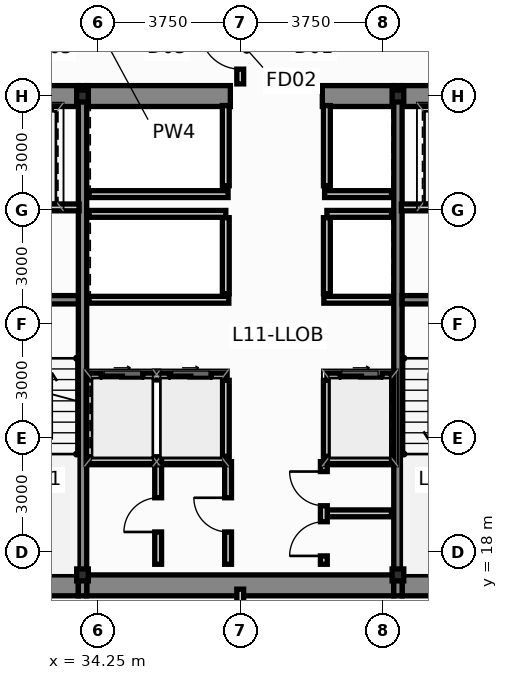
"""IFC4 building model, lengths in metres.
Left out: names, types, materials, properties, quantities, classifications, styles, units other than length and angle.
Written with IfcOpenShell. Run it as: python <this file> out.ifc"""

import sys

from ifc_helpers import new_model, si_unit, direction, frame, frame_2d, origin, origin_2d, place, context, subcontext, project, spatial, rectangle, i_section, extrude, source, transform, mapped, element, fill, save


model = new_model("IFC4")
c1 = context("Model", 3, precision=1e-05, world=origin(), true_north=direction((0.0, 1.0)))
c2 = subcontext(c1, "Body", "Model", "MODEL_VIEW")
j1 = project(units=[si_unit("LENGTHUNIT", "METRE"), si_unit("PLANEANGLEUNIT", "RADIAN")], contexts=[c1])
p1 = place(None, origin())
s1 = spatial("IfcSite", under=j1, at=p1, CompositionType="ELEMENT")
p2 = place(p1, origin())
s2 = spatial("IfcBuilding", under=s1, at=p2, CompositionType="ELEMENT")
p3 = place(p2, frame((0.0, 0.0, 45.85)))
s3 = spatial("IfcBuildingStorey", under=s2, at=p3, CompositionType="ELEMENT", Elevation=45.85)
m1 = source(origin(), c2, "Body", "SweptSolid", [
    extrude(i_section(OverallWidth=0.307, OverallDepth=0.315, WebThickness=0.012, FlangeThickness=0.019, at=origin_2d()), origin(), (0.0, 0.0, 1.0), 3.65),
])
for number, where, z_axis, x_axis in (
    (1, (33.85, 17.4, 0.0), (0.0, 0.0, 1.0), (1.0, 0.0, 0.0)),
    (2, (42.15, 17.4, 0.0), (0.0, 0.0, 1.0), (1.0, 0.0, 0.0)),
    (3, (33.85, 30.0, 0.0), (0.0, 0.0, 1.0), (1.0, 0.0, 0.0)),
    (4, (42.15, 30.0, 0.0), (0.0, 0.0, 1.0), (1.0, 0.0, 0.0)),
):
    element("IfcColumn", number, at=place(p3, frame(where, z_axis=z_axis, x_axis=x_axis)), inside=s3, PredefinedType="COLUMN", context=c2, shape_type="MappedRepresentation", body=[
        mapped(m1, transform((0.0, 0.0, 0.0), scale=1.0)),
    ])
p4 = place(p3, frame((30.84, 17.125, 0.0), z_axis=(0.0, 0.0, 1.0), x_axis=(1.0, 0.0, 0.0)))
e5 = element("IfcWall", 5, at=p4, inside=s3, PredefinedType="SHEAR", context=c2, shape_type="SweptSolid", body=[
    extrude(rectangle(XDim=2.9, YDim=0.55, at=frame_2d((1.45, 0.0))), origin(), (0.0, 0.0, 1.0), 3.65),
])
p5 = place(p3, frame((33.96, 17.125, 0.0), z_axis=(0.0, 0.0, 1.0), x_axis=(1.0, 0.0, 0.0)))
e6 = element("IfcWall", 6, at=p5, inside=s3, PredefinedType="SHEAR", context=c2, shape_type="SweptSolid", body=[
    extrude(rectangle(XDim=8.08, YDim=0.55, at=frame_2d((4.04, 0.0))), origin(), (0.0, 0.0, 1.0), 3.65),
])
for number, where, z_axis, x_axis in (
    (7, (42.26, 17.125, 0.0), (0.0, 0.0, 1.0), (1.0, 0.0, 0.0)),
    (8, (30.84, 30.0, 0.0), (0.0, 0.0, 1.0), (1.0, 0.0, 0.0)),
):
    element("IfcWall", number, at=place(p3, frame(where, z_axis=z_axis, x_axis=x_axis)), inside=s3, PredefinedType="SHEAR", context=c2, shape_type="SweptSolid", body=[
        extrude(rectangle(XDim=2.9, YDim=0.55, at=frame_2d((1.45, 0.0))), origin(), (0.0, 0.0, 1.0), 3.65),
    ])
p6 = place(p3, frame((33.96, 30.0, 0.0), z_axis=(0.0, 0.0, 1.0), x_axis=(1.0, 0.0, 0.0)))
e9 = element("IfcWall", 9, at=p6, inside=s3, PredefinedType="SHEAR", context=c2, shape_type="SweptSolid", body=[
    extrude(rectangle(XDim=3.78, YDim=0.55, at=frame_2d((1.89, 0.0))), origin(), (0.0, 0.0, 1.0), 3.65),
])
p7 = place(p3, frame((40.16, 30.0, 0.0), z_axis=(0.0, 0.0, 1.0), x_axis=(1.0, 0.0, 0.0)))
e10 = element("IfcWall", 10, at=p7, inside=s3, PredefinedType="SHEAR", context=c2, shape_type="SweptSolid", body=[
    extrude(rectangle(XDim=1.88, YDim=0.55, at=frame_2d((0.94, 0.0))), origin(), (0.0, 0.0, 1.0), 3.65),
])
p8 = place(p3, frame((42.26, 30.0, 0.0), z_axis=(0.0, 0.0, 1.0), x_axis=(1.0, 0.0, 0.0)))
e11 = element("IfcWall", 11, at=p8, inside=s3, PredefinedType="SHEAR", context=c2, shape_type="SweptSolid", body=[
    extrude(rectangle(XDim=2.9, YDim=0.55, at=frame_2d((1.45, 0.0))), origin(), (0.0, 0.0, 1.0), 3.65),
])
for number, where, z_axis, x_axis in (
    (12, (33.85, 16.85, 0.0), (0.0, 0.0, 1.0), (0.0, 1.0, 0.0)),
    (13, (42.15, 16.85, 0.0), (0.0, 0.0, 1.0), (0.0, 1.0, 0.0)),
):
    element("IfcWall", number, at=place(p3, frame(where, z_axis=z_axis, x_axis=x_axis)), inside=s3, PredefinedType="SHEAR", context=c2, shape_type="SweptSolid", body=[
        extrude(rectangle(XDim=13.425, YDim=0.22, at=frame_2d((6.712, 0.0))), origin(), (0.0, 0.0, 1.0), 3.65),
    ])
for number, where, z_axis, x_axis in (
    (14, (30.84, 24.64, 0.0), (0.0, 0.0, 1.0), (1.0, 0.0, 0.0)),
    (15, (42.26, 24.64, 0.0), (0.0, 0.0, 1.0), (1.0, 0.0, 0.0)),
):
    element("IfcWall", number, at=place(p3, frame(where, z_axis=z_axis, x_axis=x_axis)), inside=s3, PredefinedType="SHEAR", context=c2, shape_type="SweptSolid", body=[
        extrude(rectangle(XDim=2.9, YDim=0.22, at=frame_2d((1.45, 0.0))), origin(), (0.0, 0.0, 1.0), 3.65),
    ])
p9 = place(p3, frame((34.02, 22.62, 0.0), z_axis=(0.0, 0.0, 1.0), x_axis=(1.0, 0.0, 0.0)))
e16 = element("IfcWall", 16, at=p9, inside=s3, PredefinedType="PARTITIONING", context=c2, shape_type="SweptSolid", body=[
    extrude(rectangle(XDim=3.6, YDim=0.18, at=frame_2d((1.8, 0.0))), origin(), (0.0, 0.0, 1.0), 3.4),
])
p10 = place(p9, frame((0.32, 0.0, 0.0)))
e17 = element("IfcOpeningElement", 17, at=p10, cuts=e16, PredefinedType="OPENING", context=c2, shape_type="SweptSolid", body=[
    extrude(rectangle(XDim=1.1, YDim=2.2, at=frame_2d((0.55, 1.1))), frame((0.0, 0.102, 0.0), z_axis=(0.0, -1.0, 0.0), x_axis=(1.0, 0.0, 0.0)), (0.0, 0.0, 1.0), 0.204),
])
p11 = place(p9, frame((2.12, 0.0, 0.0)))
e18 = element("IfcOpeningElement", 18, at=p11, cuts=e16, PredefinedType="OPENING", context=c2, shape_type="SweptSolid", body=[
    extrude(rectangle(XDim=1.1, YDim=2.2, at=frame_2d((0.55, 1.1))), frame((0.0, 0.102, 0.0), z_axis=(0.0, -1.0, 0.0), x_axis=(1.0, 0.0, 0.0)), (0.0, 0.0, 1.0), 0.204),
])
p12 = place(p3, frame((40.28, 22.62, 0.0), z_axis=(0.0, 0.0, 1.0), x_axis=(1.0, 0.0, 0.0)))
e19 = element("IfcWall", 19, at=p12, inside=s3, PredefinedType="PARTITIONING", context=c2, shape_type="SweptSolid", body=[
    extrude(rectangle(XDim=1.7, YDim=0.18, at=frame_2d((0.85, 0.0))), origin(), (0.0, 0.0, 1.0), 3.4),
])
p13 = place(p12, frame((0.35, 0.0, 0.0)))
e20 = element("IfcOpeningElement", 20, at=p13, cuts=e19, PredefinedType="OPENING", context=c2, shape_type="SweptSolid", body=[
    extrude(rectangle(XDim=1.1, YDim=2.2, at=frame_2d((0.55, 1.1))), frame((0.0, 0.102, 0.0), z_axis=(0.0, -1.0, 0.0), x_axis=(1.0, 0.0, 0.0)), (0.0, 0.0, 1.0), 0.204),
])
for number, where, z_axis, x_axis in (
    (21, (37.62, 20.52, 0.0), (0.0, 0.0, 1.0), (0.0, 1.0, 0.0)),
    (22, (40.28, 20.52, 0.0), (0.0, 0.0, 1.0), (0.0, 1.0, 0.0)),
):
    element("IfcWall", number, at=place(p3, frame(where, z_axis=z_axis, x_axis=x_axis)), inside=s3, PredefinedType="PARTITIONING", context=c2, shape_type="SweptSolid", body=[
        extrude(rectangle(XDim=2.0, YDim=0.18, at=frame_2d((1.0, 0.0))), origin(), (0.0, 0.0, 1.0), 3.4),
    ])
p14 = place(p3, frame((34.02, 26.9, 0.0), z_axis=(0.0, 0.0, 1.0), x_axis=(1.0, 0.0, 0.0)))
e23 = element("IfcWall", 23, at=p14, inside=s3, PredefinedType="PARTITIONING", context=c2, shape_type="SweptSolid", body=[
    extrude(rectangle(XDim=3.6, YDim=0.18, at=frame_2d((1.8, 0.0))), origin(), (0.0, 0.0, 1.0), 3.4),
])
p15 = place(p3, frame((40.28, 26.9, 0.0), z_axis=(0.0, 0.0, 1.0), x_axis=(1.0, 0.0, 0.0)))
e24 = element("IfcWall", 24, at=p15, inside=s3, PredefinedType="PARTITIONING", context=c2, shape_type="SweptSolid", body=[
    extrude(rectangle(XDim=1.7, YDim=0.18, at=frame_2d((0.85, 0.0))), origin(), (0.0, 0.0, 1.0), 3.4),
])
for number, where, z_axis, x_axis in (
    (25, (37.62, 24.8, 0.0), (0.0, 0.0, 1.0), (0.0, 1.0, 0.0)),
    (26, (40.28, 24.8, 0.0), (0.0, 0.0, 1.0), (0.0, 1.0, 0.0)),
):
    element("IfcWall", number, at=place(p3, frame(where, z_axis=z_axis, x_axis=x_axis)), inside=s3, PredefinedType="PARTITIONING", context=c2, shape_type="SweptSolid", body=[
        extrude(rectangle(XDim=2.0, YDim=0.18, at=frame_2d((1.0, 0.0))), origin(), (0.0, 0.0, 1.0), 3.4),
    ])
p16 = place(p3, frame((34.02, 24.64, 0.0), z_axis=(0.0, 0.0, 1.0), x_axis=(1.0, 0.0, 0.0)))
e27 = element("IfcWall", 27, at=p16, inside=s3, PredefinedType="PARTITIONING", context=c2, shape_type="SweptSolid", body=[
    extrude(rectangle(XDim=3.68, YDim=0.18, at=frame_2d((1.84, 0.0))), origin(), (0.0, 0.0, 1.0), 3.4),
])
p17 = place(p3, frame((40.2, 24.64, 0.0), z_axis=(0.0, 0.0, 1.0), x_axis=(1.0, 0.0, 0.0)))
e28 = element("IfcWall", 28, at=p17, inside=s3, PredefinedType="PARTITIONING", context=c2, shape_type="SweptSolid", body=[
    extrude(rectangle(XDim=1.78, YDim=0.18, at=frame_2d((0.89, 0.0))), origin(), (0.0, 0.0, 1.0), 3.4),
])
p18 = place(p3, frame((34.02, 27.42, 0.0), z_axis=(0.0, 0.0, 1.0), x_axis=(1.0, 0.0, 0.0)))
e29 = element("IfcWall", 29, at=p18, inside=s3, PredefinedType="PARTITIONING", context=c2, shape_type="SweptSolid", body=[
    extrude(rectangle(XDim=3.66, YDim=0.18, at=frame_2d((1.83, 0.0))), origin(), (0.0, 0.0, 1.0), 3.4),
])
p19 = place(p3, frame((40.22, 27.42, 0.0), z_axis=(0.0, 0.0, 1.0), x_axis=(1.0, 0.0, 0.0)))
e30 = element("IfcWall", 30, at=p19, inside=s3, PredefinedType="PARTITIONING", context=c2, shape_type="SweptSolid", body=[
    extrude(rectangle(XDim=1.76, YDim=0.18, at=frame_2d((0.88, 0.0))), origin(), (0.0, 0.0, 1.0), 3.4),
])
for number, where, z_axis, x_axis in (
    (31, (37.62, 27.64, 0.0), (0.0, 0.0, 1.0), (0.0, 1.0, 0.0)),
    (32, (40.28, 27.64, 0.0), (0.0, 0.0, 1.0), (0.0, 1.0, 0.0)),
):
    element("IfcWall", number, at=place(p3, frame(where, z_axis=z_axis, x_axis=x_axis)), inside=s3, PredefinedType="PARTITIONING", context=c2, shape_type="SweptSolid", body=[
        extrude(rectangle(XDim=2.11, YDim=0.18, at=frame_2d((1.055, 0.0))), origin(), (0.0, 0.0, 1.0), 3.4),
    ])
for number, where, z_axis, x_axis in (
    (33, (30.86, 27.07, 0.0), (0.0, 0.0, 1.0), (1.0, 0.0, 0.0)),
    (34, (42.24, 27.07, 0.0), (0.0, 0.0, 1.0), (1.0, 0.0, 0.0)),
):
    element("IfcWall", number, at=place(p3, frame(where, z_axis=z_axis, x_axis=x_axis)), inside=s3, PredefinedType="PARTITIONING", context=c2, shape_type="SweptSolid", body=[
        extrude(rectangle(XDim=2.9, YDim=0.18, at=frame_2d((1.45, 0.0))), origin(), (0.0, 0.0, 1.0), 3.4),
    ])
p20 = place(p3, frame((34.02, 20.42, 0.0), z_axis=(0.0, 0.0, 1.0), x_axis=(1.0, 0.0, 0.0)))
e35 = element("IfcWall", 35, at=p20, inside=s3, PredefinedType="PARTITIONING", context=c2, shape_type="SweptSolid", body=[
    extrude(rectangle(XDim=3.64, YDim=0.18, at=frame_2d((1.82, 0.0))), origin(), (0.0, 0.0, 1.0), 3.4),
])
p21 = place(p3, frame((40.22, 20.42, 0.0), z_axis=(0.0, 0.0, 1.0), x_axis=(1.0, 0.0, 0.0)))
e36 = element("IfcWall", 36, at=p21, inside=s3, PredefinedType="PARTITIONING", context=c2, shape_type="SweptSolid", body=[
    extrude(rectangle(XDim=1.76, YDim=0.18, at=frame_2d((0.88, 0.0))), origin(), (0.0, 0.0, 1.0), 3.4),
])
p22 = place(p3, frame((35.84, 17.68, 0.0), z_axis=(0.0, 0.0, 1.0), x_axis=(0.0, 1.0, 0.0)))
e37 = element("IfcWall", 37, at=p22, inside=s3, PredefinedType="PARTITIONING", context=c2, shape_type="SweptSolid", body=[
    extrude(rectangle(XDim=2.7, YDim=0.18, at=frame_2d((1.35, 0.0))), origin(), (0.0, 0.0, 1.0), 3.4),
])
p23 = place(p22, frame((0.85, 0.0, 0.0)))
e38 = element("IfcOpeningElement", 38, at=p23, cuts=e37, PredefinedType="OPENING", context=c2, shape_type="SweptSolid", body=[
    extrude(rectangle(XDim=0.9, YDim=2.1, at=frame_2d((0.45, 1.05))), frame((0.0, 0.102, 0.0), z_axis=(0.0, -1.0, 0.0), x_axis=(1.0, 0.0, 0.0)), (0.0, 0.0, 1.0), 0.204),
])
p24 = place(p3, frame((37.68, 17.68, 0.0), z_axis=(0.0, 0.0, 1.0), x_axis=(0.0, 1.0, 0.0)))
e39 = element("IfcWall", 39, at=p24, inside=s3, PredefinedType="PARTITIONING", context=c2, shape_type="SweptSolid", body=[
    extrude(rectangle(XDim=2.7, YDim=0.18, at=frame_2d((1.35, 0.0))), origin(), (0.0, 0.0, 1.0), 3.4),
])
p25 = place(p24, frame((0.85, 0.0, 0.0)))
e40 = element("IfcOpeningElement", 40, at=p25, cuts=e39, PredefinedType="OPENING", context=c2, shape_type="SweptSolid", body=[
    extrude(rectangle(XDim=0.9, YDim=2.1, at=frame_2d((0.45, 1.05))), frame((0.0, 0.102, 0.0), z_axis=(0.0, -1.0, 0.0), x_axis=(1.0, 0.0, 0.0)), (0.0, 0.0, 1.0), 0.204),
])
p26 = place(p3, frame((40.28, 19.02, 0.0), z_axis=(0.0, 0.0, 1.0), x_axis=(1.0, 0.0, 0.0)))
e41 = element("IfcWall", 41, at=p26, inside=s3, PredefinedType="PARTITIONING", context=c2, shape_type="SweptSolid", body=[
    extrude(rectangle(XDim=1.7, YDim=0.18, at=frame_2d((0.85, 0.0))), origin(), (0.0, 0.0, 1.0), 3.4),
])
p27 = place(p3, frame((40.2, 17.68, 0.0), z_axis=(0.0, 0.0, 1.0), x_axis=(0.0, 1.0, 0.0)))
e42 = element("IfcWall", 42, at=p27, inside=s3, PredefinedType="PARTITIONING", context=c2, shape_type="SweptSolid", body=[
    extrude(rectangle(XDim=2.7, YDim=0.18, at=frame_2d((1.35, 0.0))), origin(), (0.0, 0.0, 1.0), 3.4),
])
p28 = place(p27, frame((0.22, 0.0, 0.0)))
e43 = element("IfcOpeningElement", 43, at=p28, cuts=e42, PredefinedType="OPENING", context=c2, shape_type="SweptSolid", body=[
    extrude(rectangle(XDim=0.9, YDim=2.1, at=frame_2d((0.45, 1.05))), frame((0.0, 0.102, 0.0), z_axis=(0.0, -1.0, 0.0), x_axis=(1.0, 0.0, 0.0)), (0.0, 0.0, 1.0), 0.204),
])
p29 = place(p27, frame((1.54, 0.0, 0.0)))
e44 = element("IfcOpeningElement", 44, at=p29, cuts=e42, PredefinedType="OPENING", context=c2, shape_type="SweptSolid", body=[
    extrude(rectangle(XDim=0.9, YDim=2.1, at=frame_2d((0.45, 1.05))), frame((0.0, 0.102, 0.0), z_axis=(0.0, -1.0, 0.0), x_axis=(1.0, 0.0, 0.0)), (0.0, 0.0, 1.0), 0.204),
])
p30 = place(p3, frame((38.0, 15.205, 0.0), z_axis=(0.0, 0.0, 1.0), x_axis=(0.0, 1.0, 0.0)))
e45 = element("IfcWall", 45, at=p30, inside=s3, PredefinedType="PARTITIONING", context=c2, shape_type="SweptSolid", body=[
    extrude(rectangle(XDim=1.82, YDim=0.18, at=frame_2d((0.91, 0.0))), origin(), (0.0, 0.0, 1.0), 3.4),
])
p31 = place(p30, frame((0.385, 0.0, 0.0)))
e46 = element("IfcOpeningElement", 46, at=p31, cuts=e45, PredefinedType="OPENING", context=c2, shape_type="SweptSolid", body=[
    extrude(rectangle(XDim=1.05, YDim=2.15, at=frame_2d((0.525, 1.075))), frame((0.0, 0.102, 0.0), z_axis=(0.0, -1.0, 0.0), x_axis=(1.0, 0.0, 0.0)), (0.0, 0.0, 1.0), 0.204),
])
p32 = place(p3, frame((38.0, 30.32, 0.0), z_axis=(0.0, 0.0, 1.0), x_axis=(0.0, 1.0, 0.0)))
e47 = element("IfcWall", 47, at=p32, inside=s3, PredefinedType="PARTITIONING", context=c2, shape_type="SweptSolid", body=[
    extrude(rectangle(XDim=1.825, YDim=0.18, at=frame_2d((0.913, 0.0))), origin(), (0.0, 0.0, 1.0), 3.4),
])
p33 = place(p32, frame((0.388, 0.0, 0.0)))
e48 = element("IfcOpeningElement", 48, at=p33, cuts=e47, PredefinedType="OPENING", context=c2, shape_type="SweptSolid", body=[
    extrude(rectangle(XDim=1.05, YDim=2.15, at=frame_2d((0.525, 1.075))), frame((0.0, 0.102, 0.0), z_axis=(0.0, -1.0, 0.0), x_axis=(1.0, 0.0, 0.0)), (0.0, 0.0, 1.0), 0.204),
])
p34 = place(p10, origin())
e49 = element("IfcDoor", 49, at=p34, inside=s3, OperationType="SLIDING_TO_LEFT", PredefinedType="DOOR", context=c2, shape_type="SweptSolid", body=[
    extrude(rectangle(XDim=1.1, YDim=2.2, at=frame_2d((0.55, 1.1))), frame((0.0, 0.025, 0.0), z_axis=(0.0, -1.0, 0.0), x_axis=(1.0, 0.0, 0.0)), (0.0, 0.0, 1.0), 0.05),
])
fill(e17, e49)
p35 = place(p11, origin())
e50 = element("IfcDoor", 50, at=p35, inside=s3, OperationType="SLIDING_TO_RIGHT", PredefinedType="DOOR", context=c2, shape_type="SweptSolid", body=[
    extrude(rectangle(XDim=1.1, YDim=2.2, at=frame_2d((0.55, 1.1))), frame((0.0, 0.025, 0.0), z_axis=(0.0, -1.0, 0.0), x_axis=(1.0, 0.0, 0.0)), (0.0, 0.0, 1.0), 0.05),
])
fill(e18, e50)
p36 = place(p13, origin())
e51 = element("IfcDoor", 51, at=p36, inside=s3, OperationType="SLIDING_TO_LEFT", PredefinedType="DOOR", context=c2, shape_type="SweptSolid", body=[
    extrude(rectangle(XDim=1.1, YDim=2.2, at=frame_2d((0.55, 1.1))), frame((0.0, 0.025, 0.0), z_axis=(0.0, -1.0, 0.0), x_axis=(1.0, 0.0, 0.0)), (0.0, 0.0, 1.0), 0.05),
])
fill(e20, e51)
p37 = place(p23, origin())
e52 = element("IfcDoor", 52, at=p37, inside=s3, OperationType="SINGLE_SWING_LEFT", PredefinedType="DOOR", context=c2, shape_type="SweptSolid", body=[
    extrude(rectangle(XDim=0.9, YDim=2.1, at=frame_2d((0.45, 1.05))), frame((0.0, 0.025, 0.0), z_axis=(0.0, -1.0, 0.0), x_axis=(1.0, 0.0, 0.0)), (0.0, 0.0, 1.0), 0.05),
])
fill(e38, e52)
p38 = place(p25, origin())
e53 = element("IfcDoor", 53, at=p38, inside=s3, OperationType="SINGLE_SWING_RIGHT", PredefinedType="DOOR", context=c2, shape_type="SweptSolid", body=[
    extrude(rectangle(XDim=0.9, YDim=2.1, at=frame_2d((0.45, 1.05))), frame((0.0, 0.025, 0.0), z_axis=(0.0, -1.0, 0.0), x_axis=(1.0, 0.0, 0.0)), (0.0, 0.0, 1.0), 0.05),
])
fill(e40, e53)
p39 = place(p28, origin())
e54 = element("IfcDoor", 54, at=p39, inside=s3, OperationType="SINGLE_SWING_LEFT", PredefinedType="DOOR", context=c2, shape_type="SweptSolid", body=[
    extrude(rectangle(XDim=0.9, YDim=2.1, at=frame_2d((0.45, 1.05))), frame((0.0, 0.025, 0.0), z_axis=(0.0, -1.0, 0.0), x_axis=(1.0, 0.0, 0.0)), (0.0, 0.0, 1.0), 0.05),
])
fill(e43, e54)
p40 = place(p29, origin())
e55 = element("IfcDoor", 55, at=p40, inside=s3, OperationType="SINGLE_SWING_RIGHT", PredefinedType="DOOR", context=c2, shape_type="SweptSolid", body=[
    extrude(rectangle(XDim=0.9, YDim=2.1, at=frame_2d((0.45, 1.05))), frame((0.0, 0.025, 0.0), z_axis=(0.0, -1.0, 0.0), x_axis=(1.0, 0.0, 0.0)), (0.0, 0.0, 1.0), 0.05),
])
fill(e44, e55)
p41 = place(p33, origin())
e56 = element("IfcDoor", 56, at=p41, inside=s3, OperationType="SINGLE_SWING_RIGHT", PredefinedType="DOOR", context=c2, shape_type="SweptSolid", body=[
    extrude(rectangle(XDim=1.05, YDim=2.15, at=frame_2d((0.525, 1.075))), frame((0.0, 0.025, 0.0), z_axis=(0.0, -1.0, 0.0), x_axis=(1.0, 0.0, 0.0)), (0.0, 0.0, 1.0), 0.05),
])
fill(e48, e56)
save(model, sys.argv[1])
